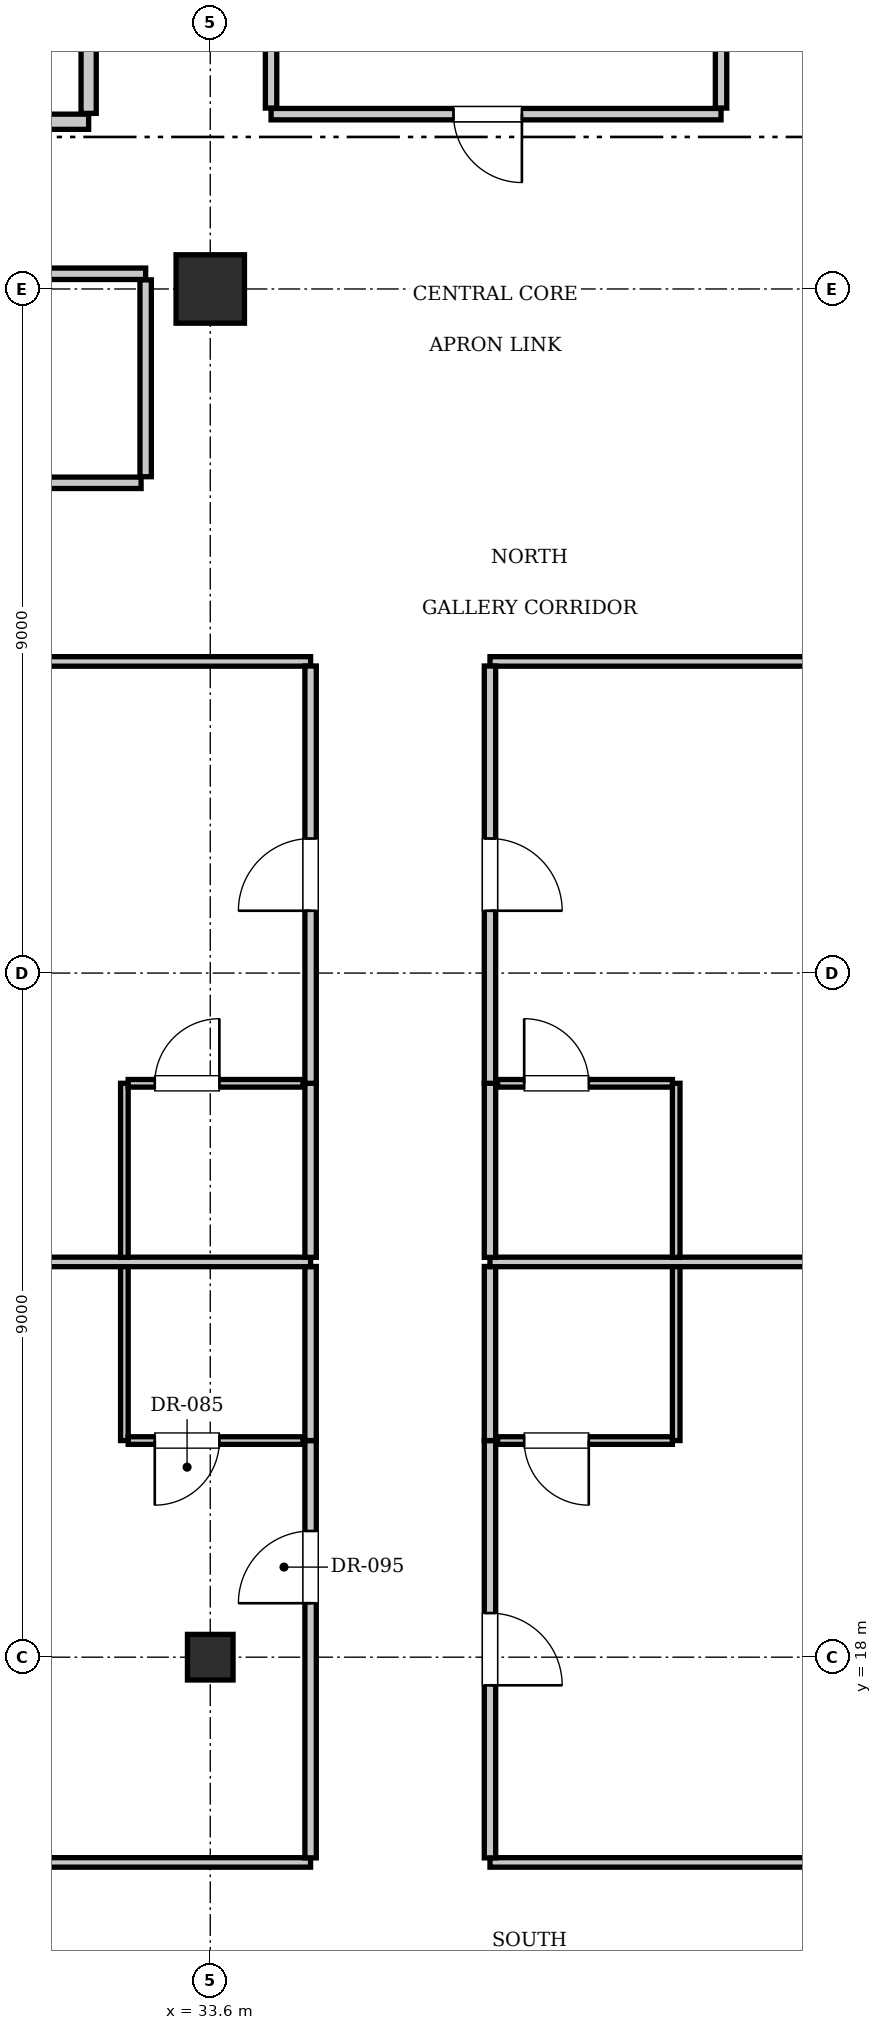
"""IFC4 building model, lengths in metres.
Left out: names, types, materials, properties, quantities, classifications, styles, units other than length and angle.
Written with IfcOpenShell. Run it as: python <this file> out.ifc"""

import sys

from ifc_helpers import new_model, si_unit, direction, frame, frame_2d, origin, origin_2d, place, context, subcontext, project, spatial, rectangle, i_section, extrude, element, fill, save


model = new_model("IFC4")
c1 = context("Model", 3, precision=1e-05, world=origin(), true_north=direction((0.0, 1.0)))
c2 = subcontext(c1, "Body", "Model", "MODEL_VIEW")
j1 = project(units=[si_unit("LENGTHUNIT", "METRE"), si_unit("PLANEANGLEUNIT", "RADIAN")], contexts=[c1])
p1 = place(None, origin())
s1 = spatial("IfcSite", under=j1, at=p1, CompositionType="ELEMENT")
p2 = place(p1, origin())
s2 = spatial("IfcBuilding", under=s1, at=p2, CompositionType="ELEMENT")
p3 = place(p2, frame((0.0, 0.0, 219.8)))
s3 = spatial("IfcBuildingStorey", under=s2, at=p3, CompositionType="ELEMENT", Elevation=219.8)
p4 = place(p3, frame((33.6, 36.0, 0.0), z_axis=(0.0, 0.0, 1.0), x_axis=(1.0, 0.0, 0.0)))
e1 = element("IfcColumn", 1, at=p4, inside=s3, PredefinedType="COLUMN", context=c2, shape_type="SweptSolid", body=[
    extrude(rectangle(XDim=0.9, YDim=0.9, at=origin_2d()), origin(), (0.0, 0.0, 1.0), 3.85),
])
p5 = place(p3, frame((33.6, 18.0, 0.0), z_axis=(0.0, 0.0, 1.0), x_axis=(1.0, 0.0, 0.0)))
e2 = element("IfcColumn", 2, at=p5, inside=s3, PredefinedType="COLUMN", context=c2, shape_type="SweptSolid", body=[
    extrude(i_section(OverallWidth=0.6, OverallDepth=0.6, WebThickness=0.025, FlangeThickness=0.038, at=origin_2d()), origin(), (0.0, 0.0, 1.0), 3.85),
])
p6 = place(p3, frame((26.2, 38.2, 0.0), z_axis=(0.0, 0.0, 1.0), x_axis=(1.0, 0.0, 0.0)))
e3 = element("IfcWall", 3, at=p6, inside=s3, PredefinedType="PARTITIONING", context=c2, shape_type="SweptSolid", body=[
    extrude(rectangle(XDim=5.8, YDim=0.2, at=frame_2d((2.9, 0.0))), origin(), (0.0, 0.0, 1.0), 3.61),
])
p7 = place(p6, frame((2.3, 0.0, 0.0)))
e4 = element("IfcOpeningElement", 4, at=p7, cuts=e3, PredefinedType="OPENING", context=c2, shape_type="SweptSolid", body=[
    extrude(rectangle(XDim=1.15, YDim=2.15, at=frame_2d((0.575, 1.075))), frame((0.0, 0.11, 0.0), z_axis=(0.0, -1.0, 0.0), x_axis=(1.0, 0.0, 0.0)), (0.0, 0.0, 1.0), 0.22),
])
p8 = place(p3, frame((32.0, 38.31, 0.0), z_axis=(0.0, 0.0, 1.0), x_axis=(0.0, 1.0, 0.0)))
e5 = element("IfcWall", 5, at=p8, inside=s3, PredefinedType="PARTITIONING", context=c2, shape_type="SweptSolid", body=[
    extrude(rectangle(XDim=3.07, YDim=0.2, at=frame_2d((1.535, 0.0))), origin(), (0.0, 0.0, 1.0), 3.61),
])
p9 = place(p3, frame((34.4, 38.3, 0.0), z_axis=(0.0, 0.0, 1.0), x_axis=(1.0, 0.0, 0.0)))
e6 = element("IfcWall", 6, at=p9, inside=s3, PredefinedType="PARTITIONING", context=c2, shape_type="SweptSolid", body=[
    extrude(rectangle(XDim=5.92, YDim=0.15, at=frame_2d((2.96, 0.0))), origin(), (0.0, 0.0, 1.0), 3.61),
])
p10 = place(p9, frame((2.4, 0.0, 0.0)))
e7 = element("IfcOpeningElement", 7, at=p10, cuts=e6, PredefinedType="OPENING", context=c2, shape_type="SweptSolid", body=[
    extrude(rectangle(XDim=0.9, YDim=2.1, at=frame_2d((0.45, 1.05))), frame((0.0, 0.085, 0.0), z_axis=(0.0, -1.0, 0.0), x_axis=(1.0, 0.0, 0.0)), (0.0, 0.0, 1.0), 0.17),
])
for number, where, z_axis, x_axis in (
    (8, (34.4, 38.38, 0.0), (0.0, 0.0, 1.0), (0.0, 1.0, 0.0)),
    (9, (40.32, 38.38, 0.0), (0.0, 0.0, 1.0), (0.0, 1.0, 0.0)),
):
    element("IfcWall", number, at=place(p3, frame(where, z_axis=z_axis, x_axis=x_axis)), inside=s3, PredefinedType="PARTITIONING", context=c2, shape_type="SweptSolid", body=[
        extrude(rectangle(XDim=2.84, YDim=0.15, at=frame_2d((1.42, 0.0))), origin(), (0.0, 0.0, 1.0), 3.61),
    ])
p11 = place(p3, frame((28.32, 36.2, 0.0), z_axis=(0.0, 0.0, 1.0), x_axis=(1.0, 0.0, 0.0)))
e10 = element("IfcWall", 10, at=p11, inside=s3, PredefinedType="PARTITIONING", context=c2, shape_type="SweptSolid", body=[
    extrude(rectangle(XDim=4.43, YDim=0.15, at=frame_2d((2.215, 0.0))), origin(), (0.0, 0.0, 1.0), 3.61),
])
p12 = place(p3, frame((32.75, 33.53, 0.0), z_axis=(0.0, 0.0, 1.0), x_axis=(0.0, 1.0, 0.0)))
e11 = element("IfcWall", 11, at=p12, inside=s3, PredefinedType="PARTITIONING", context=c2, shape_type="SweptSolid", body=[
    extrude(rectangle(XDim=2.59, YDim=0.15, at=frame_2d((1.295, 0.0))), origin(), (0.0, 0.0, 1.0), 3.61),
])
p13 = place(p3, frame((28.38, 33.45, 0.0), z_axis=(0.0, 0.0, 1.0), x_axis=(1.0, 0.0, 0.0)))
e12 = element("IfcWall", 12, at=p13, inside=s3, PredefinedType="PARTITIONING", context=c2, shape_type="SweptSolid", body=[
    extrude(rectangle(XDim=4.31, YDim=0.15, at=frame_2d((2.155, 0.0))), origin(), (0.0, 0.0, 1.0), 3.61),
])
p14 = place(p13, frame((1.705, 0.0, 0.0)))
e13 = element("IfcOpeningElement", 13, at=p14, cuts=e12, PredefinedType="OPENING", context=c2, shape_type="SweptSolid", body=[
    extrude(rectangle(XDim=0.9, YDim=2.1, at=frame_2d((0.45, 1.05))), frame((0.0, 0.085, 0.0), z_axis=(0.0, -1.0, 0.0), x_axis=(1.0, 0.0, 0.0)), (0.0, 0.0, 1.0), 0.17),
])
p15 = place(p3, frame((13.2, 15.3, 0.0), z_axis=(0.0, 0.0, 1.0), x_axis=(1.0, 0.0, 0.0)))
e14 = element("IfcWall", 14, at=p15, inside=s3, PredefinedType="PARTITIONING", context=c2, shape_type="SweptSolid", body=[
    extrude(rectangle(XDim=21.72, YDim=0.125, at=frame_2d((10.86, 0.0))), origin(), (0.0, 0.0, 1.0), 3.61),
])
p16 = place(p3, frame((37.28, 15.3, 0.0), z_axis=(0.0, 0.0, 1.0), x_axis=(1.0, 0.0, 0.0)))
e15 = element("IfcWall", 15, at=p16, inside=s3, PredefinedType="PARTITIONING", context=c2, shape_type="SweptSolid", body=[
    extrude(rectangle(XDim=25.12, YDim=0.125, at=frame_2d((12.56, 0.0))), origin(), (0.0, 0.0, 1.0), 3.61),
])
p17 = place(p3, frame((13.2, 31.1, 0.0), z_axis=(0.0, 0.0, 1.0), x_axis=(1.0, 0.0, 0.0)))
e16 = element("IfcWall", 16, at=p17, inside=s3, PredefinedType="PARTITIONING", context=c2, shape_type="SweptSolid", body=[
    extrude(rectangle(XDim=21.72, YDim=0.125, at=frame_2d((10.86, 0.0))), origin(), (0.0, 0.0, 1.0), 3.61),
])
p18 = place(p3, frame((37.28, 31.1, 0.0), z_axis=(0.0, 0.0, 1.0), x_axis=(1.0, 0.0, 0.0)))
e17 = element("IfcWall", 17, at=p18, inside=s3, PredefinedType="PARTITIONING", context=c2, shape_type="SweptSolid", body=[
    extrude(rectangle(XDim=25.12, YDim=0.125, at=frame_2d((12.56, 0.0))), origin(), (0.0, 0.0, 1.0), 3.61),
])
p19 = place(p3, frame((34.92, 15.36, 0.0), z_axis=(0.0, 0.0, 1.0), x_axis=(0.0, 1.0, 0.0)))
e18 = element("IfcWall", 18, at=p19, inside=s3, PredefinedType="PARTITIONING", context=c2, shape_type="SweptSolid", body=[
    extrude(rectangle(XDim=5.49, YDim=0.15, at=frame_2d((2.745, 0.0))), origin(), (0.0, 0.0, 1.0), 3.61),
])
p20 = place(p19, frame((3.35, 0.0, 0.0)))
e19 = element("IfcOpeningElement", 19, at=p20, cuts=e18, PredefinedType="OPENING", context=c2, shape_type="SweptSolid", body=[
    extrude(rectangle(XDim=0.95, YDim=2.15, at=frame_2d((0.475, 1.075))), frame((0.0, 0.085, 0.0), z_axis=(0.0, -1.0, 0.0), x_axis=(1.0, 0.0, 0.0)), (0.0, 0.0, 1.0), 0.17),
])
p21 = place(p3, frame((34.92, 20.85, 0.0), z_axis=(0.0, 0.0, 1.0), x_axis=(0.0, 1.0, 0.0)))
e20 = element("IfcWall", 20, at=p21, inside=s3, PredefinedType="PARTITIONING", context=c2, shape_type="SweptSolid", body=[
    extrude(rectangle(XDim=2.29, YDim=0.15, at=frame_2d((1.145, 0.0))), origin(), (0.0, 0.0, 1.0), 3.61),
])
p22 = place(p3, frame((32.47, 20.85, 0.0), z_axis=(0.0, 0.0, 1.0), x_axis=(0.0, 1.0, 0.0)))
e21 = element("IfcWall", 21, at=p22, inside=s3, PredefinedType="PARTITIONING", context=c2, shape_type="SweptSolid", body=[
    extrude(rectangle(XDim=2.29, YDim=0.1, at=frame_2d((1.145, 0.0))), origin(), (0.0, 0.0, 1.0), 3.61),
])
p23 = place(p3, frame((32.52, 20.85, 0.0), z_axis=(0.0, 0.0, 1.0), x_axis=(1.0, 0.0, 0.0)))
e22 = element("IfcWall", 22, at=p23, inside=s3, PredefinedType="PARTITIONING", context=c2, shape_type="SweptSolid", body=[
    extrude(rectangle(XDim=2.3, YDim=0.1, at=frame_2d((1.15, 0.0))), origin(), (0.0, 0.0, 1.0), 3.61),
])
p24 = place(p23, frame((0.35, 0.0, 0.0)))
e23 = element("IfcOpeningElement", 23, at=p24, cuts=e22, PredefinedType="OPENING", context=c2, shape_type="SweptSolid", body=[
    extrude(rectangle(XDim=0.85, YDim=2.1, at=frame_2d((0.425, 1.05))), frame((0.0, 0.06, 0.0), z_axis=(0.0, -1.0, 0.0), x_axis=(1.0, 0.0, 0.0)), (0.0, 0.0, 1.0), 0.12),
])
p25 = place(p3, frame((37.28, 15.36, 0.0), z_axis=(0.0, 0.0, 1.0), x_axis=(0.0, 1.0, 0.0)))
e24 = element("IfcWall", 24, at=p25, inside=s3, PredefinedType="PARTITIONING", context=c2, shape_type="SweptSolid", body=[
    extrude(rectangle(XDim=5.49, YDim=0.15, at=frame_2d((2.745, 0.0))), origin(), (0.0, 0.0, 1.0), 3.61),
])
p26 = place(p25, frame((2.27, 0.0, 0.0)))
e25 = element("IfcOpeningElement", 25, at=p26, cuts=e24, PredefinedType="OPENING", context=c2, shape_type="SweptSolid", body=[
    extrude(rectangle(XDim=0.95, YDim=2.15, at=frame_2d((0.475, 1.075))), frame((0.0, 0.085, 0.0), z_axis=(0.0, -1.0, 0.0), x_axis=(1.0, 0.0, 0.0)), (0.0, 0.0, 1.0), 0.17),
])
p27 = place(p3, frame((37.28, 20.85, 0.0), z_axis=(0.0, 0.0, 1.0), x_axis=(0.0, 1.0, 0.0)))
e26 = element("IfcWall", 26, at=p27, inside=s3, PredefinedType="PARTITIONING", context=c2, shape_type="SweptSolid", body=[
    extrude(rectangle(XDim=2.29, YDim=0.15, at=frame_2d((1.145, 0.0))), origin(), (0.0, 0.0, 1.0), 3.61),
])
p28 = place(p3, frame((39.73, 20.85, 0.0), z_axis=(0.0, 0.0, 1.0), x_axis=(0.0, 1.0, 0.0)))
e27 = element("IfcWall", 27, at=p28, inside=s3, PredefinedType="PARTITIONING", context=c2, shape_type="SweptSolid", body=[
    extrude(rectangle(XDim=2.29, YDim=0.1, at=frame_2d((1.145, 0.0))), origin(), (0.0, 0.0, 1.0), 3.61),
])
p29 = place(p3, frame((37.38, 20.85, 0.0), z_axis=(0.0, 0.0, 1.0), x_axis=(1.0, 0.0, 0.0)))
e28 = element("IfcWall", 28, at=p29, inside=s3, PredefinedType="PARTITIONING", context=c2, shape_type="SweptSolid", body=[
    extrude(rectangle(XDim=2.3, YDim=0.1, at=frame_2d((1.15, 0.0))), origin(), (0.0, 0.0, 1.0), 3.61),
])
p30 = place(p29, frame((0.35, 0.0, 0.0)))
e29 = element("IfcOpeningElement", 29, at=p30, cuts=e28, PredefinedType="OPENING", context=c2, shape_type="SweptSolid", body=[
    extrude(rectangle(XDim=0.85, YDim=2.1, at=frame_2d((0.425, 1.05))), frame((0.0, 0.06, 0.0), z_axis=(0.0, -1.0, 0.0), x_axis=(1.0, 0.0, 0.0)), (0.0, 0.0, 1.0), 0.12),
])
p31 = place(p3, frame((13.2, 23.2, 0.0), z_axis=(0.0, 0.0, 1.0), x_axis=(1.0, 0.0, 0.0)))
e30 = element("IfcWall", 30, at=p31, inside=s3, PredefinedType="PARTITIONING", context=c2, shape_type="SweptSolid", body=[
    extrude(rectangle(XDim=21.72, YDim=0.125, at=frame_2d((10.86, 0.0))), origin(), (0.0, 0.0, 1.0), 3.61),
])
p32 = place(p3, frame((37.28, 23.2, 0.0), z_axis=(0.0, 0.0, 1.0), x_axis=(1.0, 0.0, 0.0)))
e31 = element("IfcWall", 31, at=p32, inside=s3, PredefinedType="PARTITIONING", context=c2, shape_type="SweptSolid", body=[
    extrude(rectangle(XDim=25.12, YDim=0.125, at=frame_2d((12.56, 0.0))), origin(), (0.0, 0.0, 1.0), 3.61),
])
p33 = place(p3, frame((34.92, 23.26, 0.0), z_axis=(0.0, 0.0, 1.0), x_axis=(0.0, 1.0, 0.0)))
e32 = element("IfcWall", 32, at=p33, inside=s3, PredefinedType="PARTITIONING", context=c2, shape_type="SweptSolid", body=[
    extrude(rectangle(XDim=2.29, YDim=0.15, at=frame_2d((1.145, 0.0))), origin(), (0.0, 0.0, 1.0), 3.61),
])
p34 = place(p3, frame((34.92, 25.55, 0.0), z_axis=(0.0, 0.0, 1.0), x_axis=(0.0, 1.0, 0.0)))
e33 = element("IfcWall", 33, at=p34, inside=s3, PredefinedType="PARTITIONING", context=c2, shape_type="SweptSolid", body=[
    extrude(rectangle(XDim=5.49, YDim=0.15, at=frame_2d((2.745, 0.0))), origin(), (0.0, 0.0, 1.0), 3.61),
])
p35 = place(p34, frame((2.27, 0.0, 0.0)))
e34 = element("IfcOpeningElement", 34, at=p35, cuts=e33, PredefinedType="OPENING", context=c2, shape_type="SweptSolid", body=[
    extrude(rectangle(XDim=0.95, YDim=2.15, at=frame_2d((0.475, 1.075))), frame((0.0, 0.085, 0.0), z_axis=(0.0, -1.0, 0.0), x_axis=(1.0, 0.0, 0.0)), (0.0, 0.0, 1.0), 0.17),
])
p36 = place(p3, frame((32.47, 23.26, 0.0), z_axis=(0.0, 0.0, 1.0), x_axis=(0.0, 1.0, 0.0)))
e35 = element("IfcWall", 35, at=p36, inside=s3, PredefinedType="PARTITIONING", context=c2, shape_type="SweptSolid", body=[
    extrude(rectangle(XDim=2.29, YDim=0.1, at=frame_2d((1.145, 0.0))), origin(), (0.0, 0.0, 1.0), 3.61),
])
p37 = place(p3, frame((32.52, 25.55, 0.0), z_axis=(0.0, 0.0, 1.0), x_axis=(1.0, 0.0, 0.0)))
e36 = element("IfcWall", 36, at=p37, inside=s3, PredefinedType="PARTITIONING", context=c2, shape_type="SweptSolid", body=[
    extrude(rectangle(XDim=2.3, YDim=0.1, at=frame_2d((1.15, 0.0))), origin(), (0.0, 0.0, 1.0), 3.61),
])
p38 = place(p37, frame((0.35, 0.0, 0.0)))
e37 = element("IfcOpeningElement", 37, at=p38, cuts=e36, PredefinedType="OPENING", context=c2, shape_type="SweptSolid", body=[
    extrude(rectangle(XDim=0.85, YDim=2.1, at=frame_2d((0.425, 1.05))), frame((0.0, 0.06, 0.0), z_axis=(0.0, -1.0, 0.0), x_axis=(1.0, 0.0, 0.0)), (0.0, 0.0, 1.0), 0.12),
])
p39 = place(p3, frame((37.28, 23.26, 0.0), z_axis=(0.0, 0.0, 1.0), x_axis=(0.0, 1.0, 0.0)))
e38 = element("IfcWall", 38, at=p39, inside=s3, PredefinedType="PARTITIONING", context=c2, shape_type="SweptSolid", body=[
    extrude(rectangle(XDim=2.29, YDim=0.15, at=frame_2d((1.145, 0.0))), origin(), (0.0, 0.0, 1.0), 3.61),
])
p40 = place(p3, frame((37.28, 25.55, 0.0), z_axis=(0.0, 0.0, 1.0), x_axis=(0.0, 1.0, 0.0)))
e39 = element("IfcWall", 39, at=p40, inside=s3, PredefinedType="PARTITIONING", context=c2, shape_type="SweptSolid", body=[
    extrude(rectangle(XDim=5.49, YDim=0.15, at=frame_2d((2.745, 0.0))), origin(), (0.0, 0.0, 1.0), 3.61),
])
p41 = place(p40, frame((2.27, 0.0, 0.0)))
e40 = element("IfcOpeningElement", 40, at=p41, cuts=e39, PredefinedType="OPENING", context=c2, shape_type="SweptSolid", body=[
    extrude(rectangle(XDim=0.95, YDim=2.15, at=frame_2d((0.475, 1.075))), frame((0.0, 0.085, 0.0), z_axis=(0.0, -1.0, 0.0), x_axis=(1.0, 0.0, 0.0)), (0.0, 0.0, 1.0), 0.17),
])
p42 = place(p3, frame((39.73, 23.26, 0.0), z_axis=(0.0, 0.0, 1.0), x_axis=(0.0, 1.0, 0.0)))
e41 = element("IfcWall", 41, at=p42, inside=s3, PredefinedType="PARTITIONING", context=c2, shape_type="SweptSolid", body=[
    extrude(rectangle(XDim=2.29, YDim=0.1, at=frame_2d((1.145, 0.0))), origin(), (0.0, 0.0, 1.0), 3.61),
])
p43 = place(p3, frame((37.38, 25.55, 0.0), z_axis=(0.0, 0.0, 1.0), x_axis=(1.0, 0.0, 0.0)))
e42 = element("IfcWall", 42, at=p43, inside=s3, PredefinedType="PARTITIONING", context=c2, shape_type="SweptSolid", body=[
    extrude(rectangle(XDim=2.3, YDim=0.1, at=frame_2d((1.15, 0.0))), origin(), (0.0, 0.0, 1.0), 3.61),
])
p44 = place(p43, frame((0.35, 0.0, 0.0)))
e43 = element("IfcOpeningElement", 43, at=p44, cuts=e42, PredefinedType="OPENING", context=c2, shape_type="SweptSolid", body=[
    extrude(rectangle(XDim=0.85, YDim=2.1, at=frame_2d((0.425, 1.05))), frame((0.0, 0.06, 0.0), z_axis=(0.0, -1.0, 0.0), x_axis=(1.0, 0.0, 0.0)), (0.0, 0.0, 1.0), 0.12),
])
p45 = place(p10, frame((0.9, 0.0, 0.0), z_axis=(0.0, 0.0, 1.0), x_axis=(-1.0, 0.0, 0.0)))
e44 = element("IfcDoor", 44, at=p45, inside=s3, OperationType="SINGLE_SWING_LEFT", PredefinedType="DOOR", context=c2, shape_type="SweptSolid", body=[
    extrude(rectangle(XDim=0.9, YDim=2.1, at=frame_2d((0.45, 1.05))), frame((0.0, 0.025, 0.0), z_axis=(0.0, -1.0, 0.0), x_axis=(1.0, 0.0, 0.0)), (0.0, 0.0, 1.0), 0.05),
])
fill(e7, e44)
p46 = place(p24, frame((0.85, 0.0, 0.0), z_axis=(0.0, 0.0, 1.0), x_axis=(-1.0, 0.0, 0.0)))
e45 = element("IfcDoor", 45, at=p46, inside=s3, OperationType="SINGLE_SWING_RIGHT", PredefinedType="DOOR", context=c2, shape_type="SweptSolid", body=[
    extrude(rectangle(XDim=0.85, YDim=2.1, at=frame_2d((0.425, 1.05))), frame((0.0, 0.025, 0.0), z_axis=(0.0, -1.0, 0.0), x_axis=(1.0, 0.0, 0.0)), (0.0, 0.0, 1.0), 0.05),
])
fill(e23, e45)
p47 = place(p20, origin())
e46 = element("IfcDoor", 46, at=p47, inside=s3, OperationType="SINGLE_SWING_LEFT", PredefinedType="DOOR", context=c2, shape_type="SweptSolid", body=[
    extrude(rectangle(XDim=0.95, YDim=2.15, at=frame_2d((0.475, 1.075))), frame((0.0, 0.025, 0.0), z_axis=(0.0, -1.0, 0.0), x_axis=(1.0, 0.0, 0.0)), (0.0, 0.0, 1.0), 0.05),
])
fill(e19, e46)
p48 = place(p30, frame((0.85, 0.0, 0.0), z_axis=(0.0, 0.0, 1.0), x_axis=(-1.0, 0.0, 0.0)))
e47 = element("IfcDoor", 47, at=p48, inside=s3, OperationType="SINGLE_SWING_LEFT", PredefinedType="DOOR", context=c2, shape_type="SweptSolid", body=[
    extrude(rectangle(XDim=0.85, YDim=2.1, at=frame_2d((0.425, 1.05))), frame((0.0, 0.025, 0.0), z_axis=(0.0, -1.0, 0.0), x_axis=(1.0, 0.0, 0.0)), (0.0, 0.0, 1.0), 0.05),
])
fill(e29, e47)
p49 = place(p26, frame((0.95, 0.0, 0.0), z_axis=(0.0, 0.0, 1.0), x_axis=(-1.0, 0.0, 0.0)))
e48 = element("IfcDoor", 48, at=p49, inside=s3, OperationType="SINGLE_SWING_RIGHT", PredefinedType="DOOR", context=c2, shape_type="SweptSolid", body=[
    extrude(rectangle(XDim=0.95, YDim=2.15, at=frame_2d((0.475, 1.075))), frame((0.0, 0.025, 0.0), z_axis=(0.0, -1.0, 0.0), x_axis=(1.0, 0.0, 0.0)), (0.0, 0.0, 1.0), 0.05),
])
fill(e25, e48)
p50 = place(p38, origin())
e49 = element("IfcDoor", 49, at=p50, inside=s3, OperationType="SINGLE_SWING_RIGHT", PredefinedType="DOOR", context=c2, shape_type="SweptSolid", body=[
    extrude(rectangle(XDim=0.85, YDim=2.1, at=frame_2d((0.425, 1.05))), frame((0.0, 0.025, 0.0), z_axis=(0.0, -1.0, 0.0), x_axis=(1.0, 0.0, 0.0)), (0.0, 0.0, 1.0), 0.05),
])
fill(e37, e49)
p51 = place(p35, origin())
e50 = element("IfcDoor", 50, at=p51, inside=s3, OperationType="SINGLE_SWING_LEFT", PredefinedType="DOOR", context=c2, shape_type="SweptSolid", body=[
    extrude(rectangle(XDim=0.95, YDim=2.15, at=frame_2d((0.475, 1.075))), frame((0.0, 0.025, 0.0), z_axis=(0.0, -1.0, 0.0), x_axis=(1.0, 0.0, 0.0)), (0.0, 0.0, 1.0), 0.05),
])
fill(e34, e50)
p52 = place(p44, origin())
e51 = element("IfcDoor", 51, at=p52, inside=s3, OperationType="SINGLE_SWING_LEFT", PredefinedType="DOOR", context=c2, shape_type="SweptSolid", body=[
    extrude(rectangle(XDim=0.85, YDim=2.1, at=frame_2d((0.425, 1.05))), frame((0.0, 0.025, 0.0), z_axis=(0.0, -1.0, 0.0), x_axis=(1.0, 0.0, 0.0)), (0.0, 0.0, 1.0), 0.05),
])
fill(e43, e51)
p53 = place(p41, frame((0.95, 0.0, 0.0), z_axis=(0.0, 0.0, 1.0), x_axis=(-1.0, 0.0, 0.0)))
e52 = element("IfcDoor", 52, at=p53, inside=s3, OperationType="SINGLE_SWING_RIGHT", PredefinedType="DOOR", context=c2, shape_type="SweptSolid", body=[
    extrude(rectangle(XDim=0.95, YDim=2.15, at=frame_2d((0.475, 1.075))), frame((0.0, 0.025, 0.0), z_axis=(0.0, -1.0, 0.0), x_axis=(1.0, 0.0, 0.0)), (0.0, 0.0, 1.0), 0.05),
])
fill(e40, e52)
save(model, sys.argv[1])
